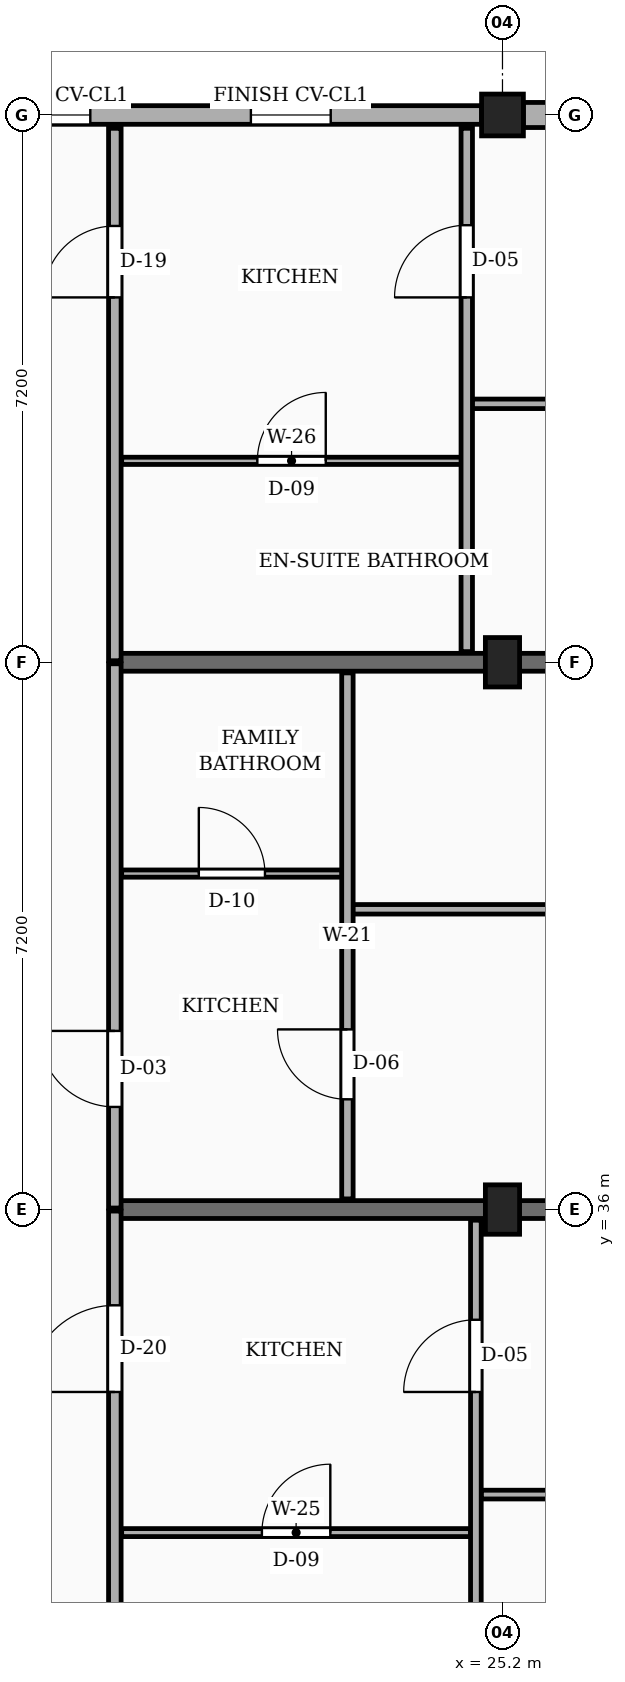
"""IFC4 building model, lengths in metres.
Left out: names, types, materials, properties, quantities, classifications, styles, units other than length and angle.
Written with IfcOpenShell. Run it as: python <this file> out.ifc"""

import sys

from ifc_helpers import new_model, si_unit, direction, frame, frame_2d, origin, origin_2d, place, context, subcontext, project, spatial, rectangle, extrude, element, fill, save


model = new_model("IFC4")
c1 = context("Model", 3, precision=1e-05, world=origin(), true_north=direction((0.0, 1.0)))
c2 = subcontext(c1, "Body", "Model", "MODEL_VIEW")
j1 = project(units=[si_unit("LENGTHUNIT", "METRE"), si_unit("PLANEANGLEUNIT", "RADIAN")], contexts=[c1])
p1 = place(None, origin())
s1 = spatial("IfcSite", under=j1, at=p1, CompositionType="ELEMENT")
p2 = place(p1, origin())
s2 = spatial("IfcBuilding", under=s1, at=p2, CompositionType="ELEMENT")
p3 = place(p2, frame((0.0, 0.0, 13.95)))
s3 = spatial("IfcBuildingStorey", under=s2, at=p3, CompositionType="ELEMENT", Elevation=13.95)
for number, where, z_axis, x_axis in (
    (1, (25.2, 36.0, 0.0), (0.0, 0.0, 1.0), (1.0, 0.0, 0.0)),
    (2, (25.2, 43.2, 0.0), (0.0, 0.0, 1.0), (1.0, 0.0, 0.0)),
):
    element("IfcColumn", number, at=place(p3, frame(where, z_axis=z_axis, x_axis=x_axis)), inside=s3, PredefinedType="COLUMN", context=c2, shape_type="SweptSolid", body=[
        extrude(rectangle(XDim=0.45, YDim=0.65, at=origin_2d()), origin(), (0.0, 0.0, 1.0), 3.15),
    ])
p4 = place(p3, frame((25.2, 50.4, 0.0), z_axis=(0.0, 0.0, 1.0), x_axis=(1.0, 0.0, 0.0)))
e3 = element("IfcColumn", 3, at=p4, inside=s3, PredefinedType="COLUMN", context=c2, shape_type="SweptSolid", body=[
    extrude(rectangle(XDim=0.55, YDim=0.55, at=origin_2d()), origin(), (0.0, 0.0, 1.0), 3.15),
])
for number, where, z_axis, x_axis in (
    (4, (20.1, 36.0, 0.0), (0.0, 0.0, 1.0), (1.0, 0.0, 0.0)),
    (5, (20.1, 43.2, 0.0), (0.0, 0.0, 1.0), (1.0, 0.0, 0.0)),
):
    element("IfcWall", number, at=place(p3, frame(where, z_axis=z_axis, x_axis=x_axis)), inside=s3, PredefinedType="SOLIDWALL", context=c2, shape_type="SweptSolid", body=[
        extrude(rectangle(XDim=12.025, YDim=0.235, at=frame_2d((6.012, 0.0))), origin(), (0.0, 0.0, 1.0), 2.17),
    ])
p5 = place(p3, frame((32.125, 50.4, 0.0), z_axis=(0.0, 0.0, 1.0), x_axis=(-1.0, 0.0, 0.0)))
e6 = element("IfcWall", 6, at=p5, inside=s3, PredefinedType="SOLIDWALL", context=c2, shape_type="SweptSolid", body=[
    extrude(rectangle(XDim=6.65, YDim=0.33, at=frame_2d((3.325, 0.0))), origin(), (0.0, 0.0, 1.0), 2.44),
])
p6 = place(p5, frame((0.45, 0.0, 0.78)))
e7 = element("IfcOpeningElement", 7, at=p6, cuts=e6, PredefinedType="OPENING", context=c2, shape_type="SweptSolid", body=[
    extrude(rectangle(XDim=1.46, YDim=1.36, at=frame_2d((0.73, 0.68))), frame((0.0, 0.175, 0.0), z_axis=(0.0, -1.0, 0.0), x_axis=(1.0, 0.0, 0.0)), (0.0, 0.0, 1.0), 0.35),
])
p7 = place(p5, frame((4.65, 0.0, 0.78)))
e8 = element("IfcOpeningElement", 8, at=p7, cuts=e6, PredefinedType="OPENING", context=c2, shape_type="SweptSolid", body=[
    extrude(rectangle(XDim=1.05, YDim=1.44, at=frame_2d((0.525, 0.72))), frame((0.0, 0.175, 0.0), z_axis=(0.0, -1.0, 0.0), x_axis=(1.0, 0.0, 0.0)), (0.0, 0.0, 1.0), 0.35),
])
p8 = place(p3, frame((24.925, 50.4, 0.0), z_axis=(0.0, 0.0, 1.0), x_axis=(-1.0, 0.0, 0.0)))
e9 = element("IfcWall", 9, at=p8, inside=s3, PredefinedType="SOLIDWALL", context=c2, shape_type="SweptSolid", body=[
    extrude(rectangle(XDim=6.65, YDim=0.245, at=frame_2d((3.325, 0.0))), origin(), (0.0, 0.0, 1.0), 2.44),
])
p9 = place(p8, frame((1.985, 0.0, 0.78)))
e10 = element("IfcOpeningElement", 10, at=p9, cuts=e9, PredefinedType="OPENING", context=c2, shape_type="SweptSolid", body=[
    extrude(rectangle(XDim=1.05, YDim=1.44, at=frame_2d((0.525, 0.72))), frame((0.0, 0.133, 0.0), z_axis=(0.0, -1.0, 0.0), x_axis=(1.0, 0.0, 0.0)), (0.0, 0.0, 1.0), 0.265),
])
p10 = place(p8, frame((5.147, 0.0, 0.78)))
e11 = element("IfcOpeningElement", 11, at=p10, cuts=e9, PredefinedType="OPENING", context=c2, shape_type="SweptSolid", body=[
    extrude(rectangle(XDim=1.04, YDim=1.26, at=frame_2d((0.52, 0.63))), frame((0.0, 0.133, 0.0), z_axis=(0.0, -1.0, 0.0), x_axis=(1.0, 0.0, 0.0)), (0.0, 0.0, 1.0), 0.265),
])
p11 = place(p3, frame((20.1, 28.82, 0.0), z_axis=(0.0, 0.0, 1.0), x_axis=(0.0, 1.0, 0.0)))
e12 = element("IfcWall", 12, at=p11, inside=s3, PredefinedType="PARTITIONING", context=c2, shape_type="SweptSolid", body=[
    extrude(rectangle(XDim=7.16, YDim=0.165, at=frame_2d((3.58, 0.0))), origin(), (0.0, 0.0, 1.0), 2.305),
])
p12 = place(p11, frame((4.78, 0.0, 0.0)))
e13 = element("IfcOpeningElement", 13, at=p12, cuts=e12, PredefinedType="OPENING", context=c2, shape_type="SweptSolid", body=[
    extrude(rectangle(XDim=1.14, YDim=2.18, at=frame_2d((0.57, 1.09))), frame((0.0, 0.093, 0.0), z_axis=(0.0, -1.0, 0.0), x_axis=(1.0, 0.0, 0.0)), (0.0, 0.0, 1.0), 0.185),
])
p13 = place(p3, frame((20.1, 36.02, 0.0), z_axis=(0.0, 0.0, 1.0), x_axis=(0.0, 1.0, 0.0)))
e14 = element("IfcWall", 14, at=p13, inside=s3, PredefinedType="PARTITIONING", context=c2, shape_type="SweptSolid", body=[
    extrude(rectangle(XDim=7.16, YDim=0.165, at=frame_2d((3.58, 0.0))), origin(), (0.0, 0.0, 1.0), 2.305),
])
p14 = place(p13, frame((1.33, 0.0, 0.0)))
e15 = element("IfcOpeningElement", 15, at=p14, cuts=e14, PredefinedType="OPENING", context=c2, shape_type="SweptSolid", body=[
    extrude(rectangle(XDim=1.0, YDim=2.15, at=frame_2d((0.5, 1.075))), frame((0.0, 0.093, 0.0), z_axis=(0.0, -1.0, 0.0), x_axis=(1.0, 0.0, 0.0)), (0.0, 0.0, 1.0), 0.185),
])
p15 = place(p3, frame((20.1, 43.22, 0.0), z_axis=(0.0, 0.0, 1.0), x_axis=(0.0, 1.0, 0.0)))
e16 = element("IfcWall", 16, at=p15, inside=s3, PredefinedType="PARTITIONING", context=c2, shape_type="SweptSolid", body=[
    extrude(rectangle(XDim=7.005, YDim=0.165, at=frame_2d((3.502, 0.0))), origin(), (0.0, 0.0, 1.0), 2.305),
])
p16 = place(p15, frame((4.78, 0.0, 0.0)))
e17 = element("IfcOpeningElement", 17, at=p16, cuts=e16, PredefinedType="OPENING", context=c2, shape_type="SweptSolid", body=[
    extrude(rectangle(XDim=0.94, YDim=2.12, at=frame_2d((0.47, 1.06))), frame((0.0, 0.093, 0.0), z_axis=(0.0, -1.0, 0.0), x_axis=(1.0, 0.0, 0.0)), (0.0, 0.0, 1.0), 0.185),
])
p17 = place(p3, frame((24.92, 32.25, 0.0), z_axis=(0.0, 0.0, 1.0), x_axis=(1.0, 0.0, 0.0)))
e18 = element("IfcWall", 18, at=p17, inside=s3, PredefinedType="PARTITIONING", context=c2, shape_type="SweptSolid", body=[
    extrude(rectangle(XDim=7.305, YDim=0.115, at=frame_2d((3.653, 0.0))), origin(), (0.0, 0.0, 1.0), 2.305),
])
p18 = place(p17, frame((3.202, 0.0, 0.0)))
e19 = element("IfcOpeningElement", 19, at=p18, cuts=e18, PredefinedType="OPENING", context=c2, shape_type="SweptSolid", body=[
    extrude(rectangle(XDim=0.9, YDim=2.1, at=frame_2d((0.45, 1.05))), frame((0.0, 0.067, 0.0), z_axis=(0.0, -1.0, 0.0), x_axis=(1.0, 0.0, 0.0)), (0.0, 0.0, 1.0), 0.135),
])
p19 = place(p3, frame((20.19, 31.75, 0.0), z_axis=(0.0, 0.0, 1.0), x_axis=(1.0, 0.0, 0.0)))
e20 = element("IfcWall", 20, at=p19, inside=s3, PredefinedType="PARTITIONING", context=c2, shape_type="SweptSolid", body=[
    extrude(rectangle(XDim=4.59, YDim=0.105, at=frame_2d((2.295, 0.0))), origin(), (0.0, 0.0, 1.0), 2.305),
])
p20 = place(p19, frame((1.845, 0.0, 0.0)))
e21 = element("IfcOpeningElement", 21, at=p20, cuts=e20, PredefinedType="OPENING", context=c2, shape_type="SweptSolid", body=[
    extrude(rectangle(XDim=0.9, YDim=2.05, at=frame_2d((0.45, 1.025))), frame((0.0, 0.062, 0.0), z_axis=(0.0, -1.0, 0.0), x_axis=(1.0, 0.0, 0.0)), (0.0, 0.0, 1.0), 0.125),
])
p21 = place(p3, frame((24.85, 28.94, 0.0), z_axis=(0.0, 0.0, 1.0), x_axis=(0.0, 1.0, 0.0)))
e22 = element("IfcWall", 22, at=p21, inside=s3, PredefinedType="PARTITIONING", context=c2, shape_type="SweptSolid", body=[
    extrude(rectangle(XDim=6.92, YDim=0.14, at=frame_2d((3.46, 0.0))), origin(), (0.0, 0.0, 1.0), 2.305),
])
p22 = place(p21, frame((4.66, 0.0, 0.0)))
e23 = element("IfcOpeningElement", 23, at=p22, cuts=e22, PredefinedType="OPENING", context=c2, shape_type="SweptSolid", body=[
    extrude(rectangle(XDim=0.95, YDim=2.1, at=frame_2d((0.475, 1.05))), frame((0.0, 0.08, 0.0), z_axis=(0.0, -1.0, 0.0), x_axis=(1.0, 0.0, 0.0)), (0.0, 0.0, 1.0), 0.16),
])
p23 = place(p3, frame((23.23, 39.95, 0.0), z_axis=(0.0, 0.0, 1.0), x_axis=(1.0, 0.0, 0.0)))
e24 = element("IfcWall", 24, at=p23, inside=s3, PredefinedType="PARTITIONING", context=c2, shape_type="SweptSolid", body=[
    extrude(rectangle(XDim=8.995, YDim=0.125, at=frame_2d((4.498, 0.0))), origin(), (0.0, 0.0, 1.0), 2.305),
])
p24 = place(p23, frame((4.058, 0.0, 0.0)))
e25 = element("IfcOpeningElement", 25, at=p24, cuts=e24, PredefinedType="OPENING", context=c2, shape_type="SweptSolid", body=[
    extrude(rectangle(XDim=0.88, YDim=2.08, at=frame_2d((0.44, 1.04))), frame((0.0, 0.073, 0.0), z_axis=(0.0, -1.0, 0.0), x_axis=(1.0, 0.0, 0.0)), (0.0, 0.0, 1.0), 0.145),
])
p25 = place(p3, frame((20.19, 40.42, 0.0), z_axis=(0.0, 0.0, 1.0), x_axis=(1.0, 0.0, 0.0)))
e26 = element("IfcWall", 26, at=p25, inside=s3, PredefinedType="PARTITIONING", context=c2, shape_type="SweptSolid", body=[
    extrude(rectangle(XDim=2.9, YDim=0.095, at=frame_2d((1.45, 0.0))), origin(), (0.0, 0.0, 1.0), 2.305),
])
p26 = place(p25, frame((1.015, 0.0, 0.0)))
e27 = element("IfcOpeningElement", 27, at=p26, cuts=e26, PredefinedType="OPENING", context=c2, shape_type="SweptSolid", body=[
    extrude(rectangle(XDim=0.87, YDim=2.05, at=frame_2d((0.435, 1.025))), frame((0.0, 0.058, 0.0), z_axis=(0.0, -1.0, 0.0), x_axis=(1.0, 0.0, 0.0)), (0.0, 0.0, 1.0), 0.115),
])
p27 = place(p3, frame((23.16, 36.14, 0.0), z_axis=(0.0, 0.0, 1.0), x_axis=(0.0, 1.0, 0.0)))
e28 = element("IfcWall", 28, at=p27, inside=s3, PredefinedType="PARTITIONING", context=c2, shape_type="SweptSolid", body=[
    extrude(rectangle(XDim=6.92, YDim=0.15, at=frame_2d((3.46, 0.0))), origin(), (0.0, 0.0, 1.0), 2.305),
])
p28 = place(p27, frame((1.31, 0.0, 0.0)))
e29 = element("IfcOpeningElement", 29, at=p28, cuts=e28, PredefinedType="OPENING", context=c2, shape_type="SweptSolid", body=[
    extrude(rectangle(XDim=0.92, YDim=2.1, at=frame_2d((0.46, 1.05))), frame((0.0, 0.085, 0.0), z_axis=(0.0, -1.0, 0.0), x_axis=(1.0, 0.0, 0.0)), (0.0, 0.0, 1.0), 0.17),
])
p29 = place(p3, frame((24.8, 46.6, 0.0), z_axis=(0.0, 0.0, 1.0), x_axis=(1.0, 0.0, 0.0)))
e30 = element("IfcWall", 30, at=p29, inside=s3, PredefinedType="PARTITIONING", context=c2, shape_type="SweptSolid", body=[
    extrude(rectangle(XDim=7.425, YDim=0.125, at=frame_2d((3.712, 0.0))), origin(), (0.0, 0.0, 1.0), 2.305),
])
p30 = place(p29, frame((3.262, 0.0, 0.0)))
e31 = element("IfcOpeningElement", 31, at=p30, cuts=e30, PredefinedType="OPENING", context=c2, shape_type="SweptSolid", body=[
    extrude(rectangle(XDim=0.9, YDim=2.1, at=frame_2d((0.45, 1.05))), frame((0.0, 0.073, 0.0), z_axis=(0.0, -1.0, 0.0), x_axis=(1.0, 0.0, 0.0)), (0.0, 0.0, 1.0), 0.145),
])
p31 = place(p3, frame((20.19, 45.85, 0.0), z_axis=(0.0, 0.0, 1.0), x_axis=(1.0, 0.0, 0.0)))
e32 = element("IfcWall", 32, at=p31, inside=s3, PredefinedType="PARTITIONING", context=c2, shape_type="SweptSolid", body=[
    extrude(rectangle(XDim=4.47, YDim=0.095, at=frame_2d((2.235, 0.0))), origin(), (0.0, 0.0, 1.0), 2.305),
])
p32 = place(p31, frame((1.785, 0.0, 0.0)))
e33 = element("IfcOpeningElement", 33, at=p32, cuts=e32, PredefinedType="OPENING", context=c2, shape_type="SweptSolid", body=[
    extrude(rectangle(XDim=0.9, YDim=2.05, at=frame_2d((0.45, 1.025))), frame((0.0, 0.058, 0.0), z_axis=(0.0, -1.0, 0.0), x_axis=(1.0, 0.0, 0.0)), (0.0, 0.0, 1.0), 0.115),
])
p33 = place(p3, frame((24.73, 43.34, 0.0), z_axis=(0.0, 0.0, 1.0), x_axis=(0.0, 1.0, 0.0)))
e34 = element("IfcWall", 34, at=p33, inside=s3, PredefinedType="PARTITIONING", context=c2, shape_type="SweptSolid", body=[
    extrude(rectangle(XDim=6.885, YDim=0.15, at=frame_2d((3.442, 0.0))), origin(), (0.0, 0.0, 1.0), 2.305),
])
p34 = place(p33, frame((4.66, 0.0, 0.0)))
e35 = element("IfcOpeningElement", 35, at=p34, cuts=e34, PredefinedType="OPENING", context=c2, shape_type="SweptSolid", body=[
    extrude(rectangle(XDim=0.95, YDim=2.1, at=frame_2d((0.475, 1.05))), frame((0.0, 0.085, 0.0), z_axis=(0.0, -1.0, 0.0), x_axis=(1.0, 0.0, 0.0)), (0.0, 0.0, 1.0), 0.17),
])
p35 = place(p9, origin())
e36 = element("IfcWindow", 36, at=p35, inside=s3, PartitioningType="SINGLE_PANEL", PredefinedType="WINDOW", context=c2, shape_type="SweptSolid", body=[
    extrude(rectangle(XDim=1.05, YDim=1.44, at=frame_2d((0.525, 0.72))), frame((0.0, 0.03, 0.0), z_axis=(0.0, -1.0, 0.0), x_axis=(1.0, 0.0, 0.0)), (0.0, 0.0, 1.0), 0.06),
])
fill(e10, e36)
p36 = place(p10, origin())
e37 = element("IfcWindow", 37, at=p36, inside=s3, PartitioningType="SINGLE_PANEL", PredefinedType="WINDOW", context=c2, shape_type="SweptSolid", body=[
    extrude(rectangle(XDim=1.04, YDim=1.26, at=frame_2d((0.52, 0.63))), frame((0.0, 0.03, 0.0), z_axis=(0.0, -1.0, 0.0), x_axis=(1.0, 0.0, 0.0)), (0.0, 0.0, 1.0), 0.06),
])
fill(e11, e37)
p37 = place(p12, origin())
e38 = element("IfcDoor", 38, at=p37, inside=s3, OperationType="SINGLE_SWING_LEFT", PredefinedType="DOOR", context=c2, shape_type="SweptSolid", body=[
    extrude(rectangle(XDim=1.14, YDim=2.18, at=frame_2d((0.57, 1.09))), frame((0.0, 0.025, 0.0), z_axis=(0.0, -1.0, 0.0), x_axis=(1.0, 0.0, 0.0)), (0.0, 0.0, 1.0), 0.05),
])
fill(e13, e38)
p38 = place(p14, origin())
e39 = element("IfcDoor", 39, at=p38, inside=s3, OperationType="SINGLE_SWING_RIGHT", PredefinedType="DOOR", context=c2, shape_type="SweptSolid", body=[
    extrude(rectangle(XDim=1.0, YDim=2.15, at=frame_2d((0.5, 1.075))), frame((0.0, 0.025, 0.0), z_axis=(0.0, -1.0, 0.0), x_axis=(1.0, 0.0, 0.0)), (0.0, 0.0, 1.0), 0.05),
])
fill(e15, e39)
p39 = place(p16, origin())
e40 = element("IfcDoor", 40, at=p39, inside=s3, OperationType="SINGLE_SWING_LEFT", PredefinedType="DOOR", context=c2, shape_type="SweptSolid", body=[
    extrude(rectangle(XDim=0.94, YDim=2.12, at=frame_2d((0.47, 1.06))), frame((0.0, 0.025, 0.0), z_axis=(0.0, -1.0, 0.0), x_axis=(1.0, 0.0, 0.0)), (0.0, 0.0, 1.0), 0.05),
])
fill(e17, e40)
p40 = place(p20, origin())
e41 = element("IfcDoor", 41, at=p40, inside=s3, OperationType="SINGLE_SWING_RIGHT", PredefinedType="DOOR", context=c2, shape_type="SweptSolid", body=[
    extrude(rectangle(XDim=0.9, YDim=2.05, at=frame_2d((0.45, 1.025))), frame((0.0, 0.025, 0.0), z_axis=(0.0, -1.0, 0.0), x_axis=(1.0, 0.0, 0.0)), (0.0, 0.0, 1.0), 0.05),
])
fill(e21, e41)
p41 = place(p22, origin())
e42 = element("IfcDoor", 42, at=p41, inside=s3, OperationType="SINGLE_SWING_LEFT", PredefinedType="DOOR", context=c2, shape_type="SweptSolid", body=[
    extrude(rectangle(XDim=0.95, YDim=2.1, at=frame_2d((0.475, 1.05))), frame((0.0, 0.025, 0.0), z_axis=(0.0, -1.0, 0.0), x_axis=(1.0, 0.0, 0.0)), (0.0, 0.0, 1.0), 0.05),
])
fill(e23, e42)
p42 = place(p26, origin())
e43 = element("IfcDoor", 43, at=p42, inside=s3, OperationType="SINGLE_SWING_LEFT", PredefinedType="DOOR", context=c2, shape_type="SweptSolid", body=[
    extrude(rectangle(XDim=0.87, YDim=2.05, at=frame_2d((0.435, 1.025))), frame((0.0, 0.025, 0.0), z_axis=(0.0, -1.0, 0.0), x_axis=(1.0, 0.0, 0.0)), (0.0, 0.0, 1.0), 0.05),
])
fill(e27, e43)
p43 = place(p28, origin())
e44 = element("IfcDoor", 44, at=p43, inside=s3, OperationType="SINGLE_SWING_RIGHT", PredefinedType="DOOR", context=c2, shape_type="SweptSolid", body=[
    extrude(rectangle(XDim=0.92, YDim=2.1, at=frame_2d((0.46, 1.05))), frame((0.0, 0.025, 0.0), z_axis=(0.0, -1.0, 0.0), x_axis=(1.0, 0.0, 0.0)), (0.0, 0.0, 1.0), 0.05),
])
fill(e29, e44)
p44 = place(p32, origin())
e45 = element("IfcDoor", 45, at=p44, inside=s3, OperationType="SINGLE_SWING_RIGHT", PredefinedType="DOOR", context=c2, shape_type="SweptSolid", body=[
    extrude(rectangle(XDim=0.9, YDim=2.05, at=frame_2d((0.45, 1.025))), frame((0.0, 0.025, 0.0), z_axis=(0.0, -1.0, 0.0), x_axis=(1.0, 0.0, 0.0)), (0.0, 0.0, 1.0), 0.05),
])
fill(e33, e45)
p45 = place(p34, origin())
e46 = element("IfcDoor", 46, at=p45, inside=s3, OperationType="SINGLE_SWING_LEFT", PredefinedType="DOOR", context=c2, shape_type="SweptSolid", body=[
    extrude(rectangle(XDim=0.95, YDim=2.1, at=frame_2d((0.475, 1.05))), frame((0.0, 0.025, 0.0), z_axis=(0.0, -1.0, 0.0), x_axis=(1.0, 0.0, 0.0)), (0.0, 0.0, 1.0), 0.05),
])
fill(e35, e46)
save(model, sys.argv[1])
